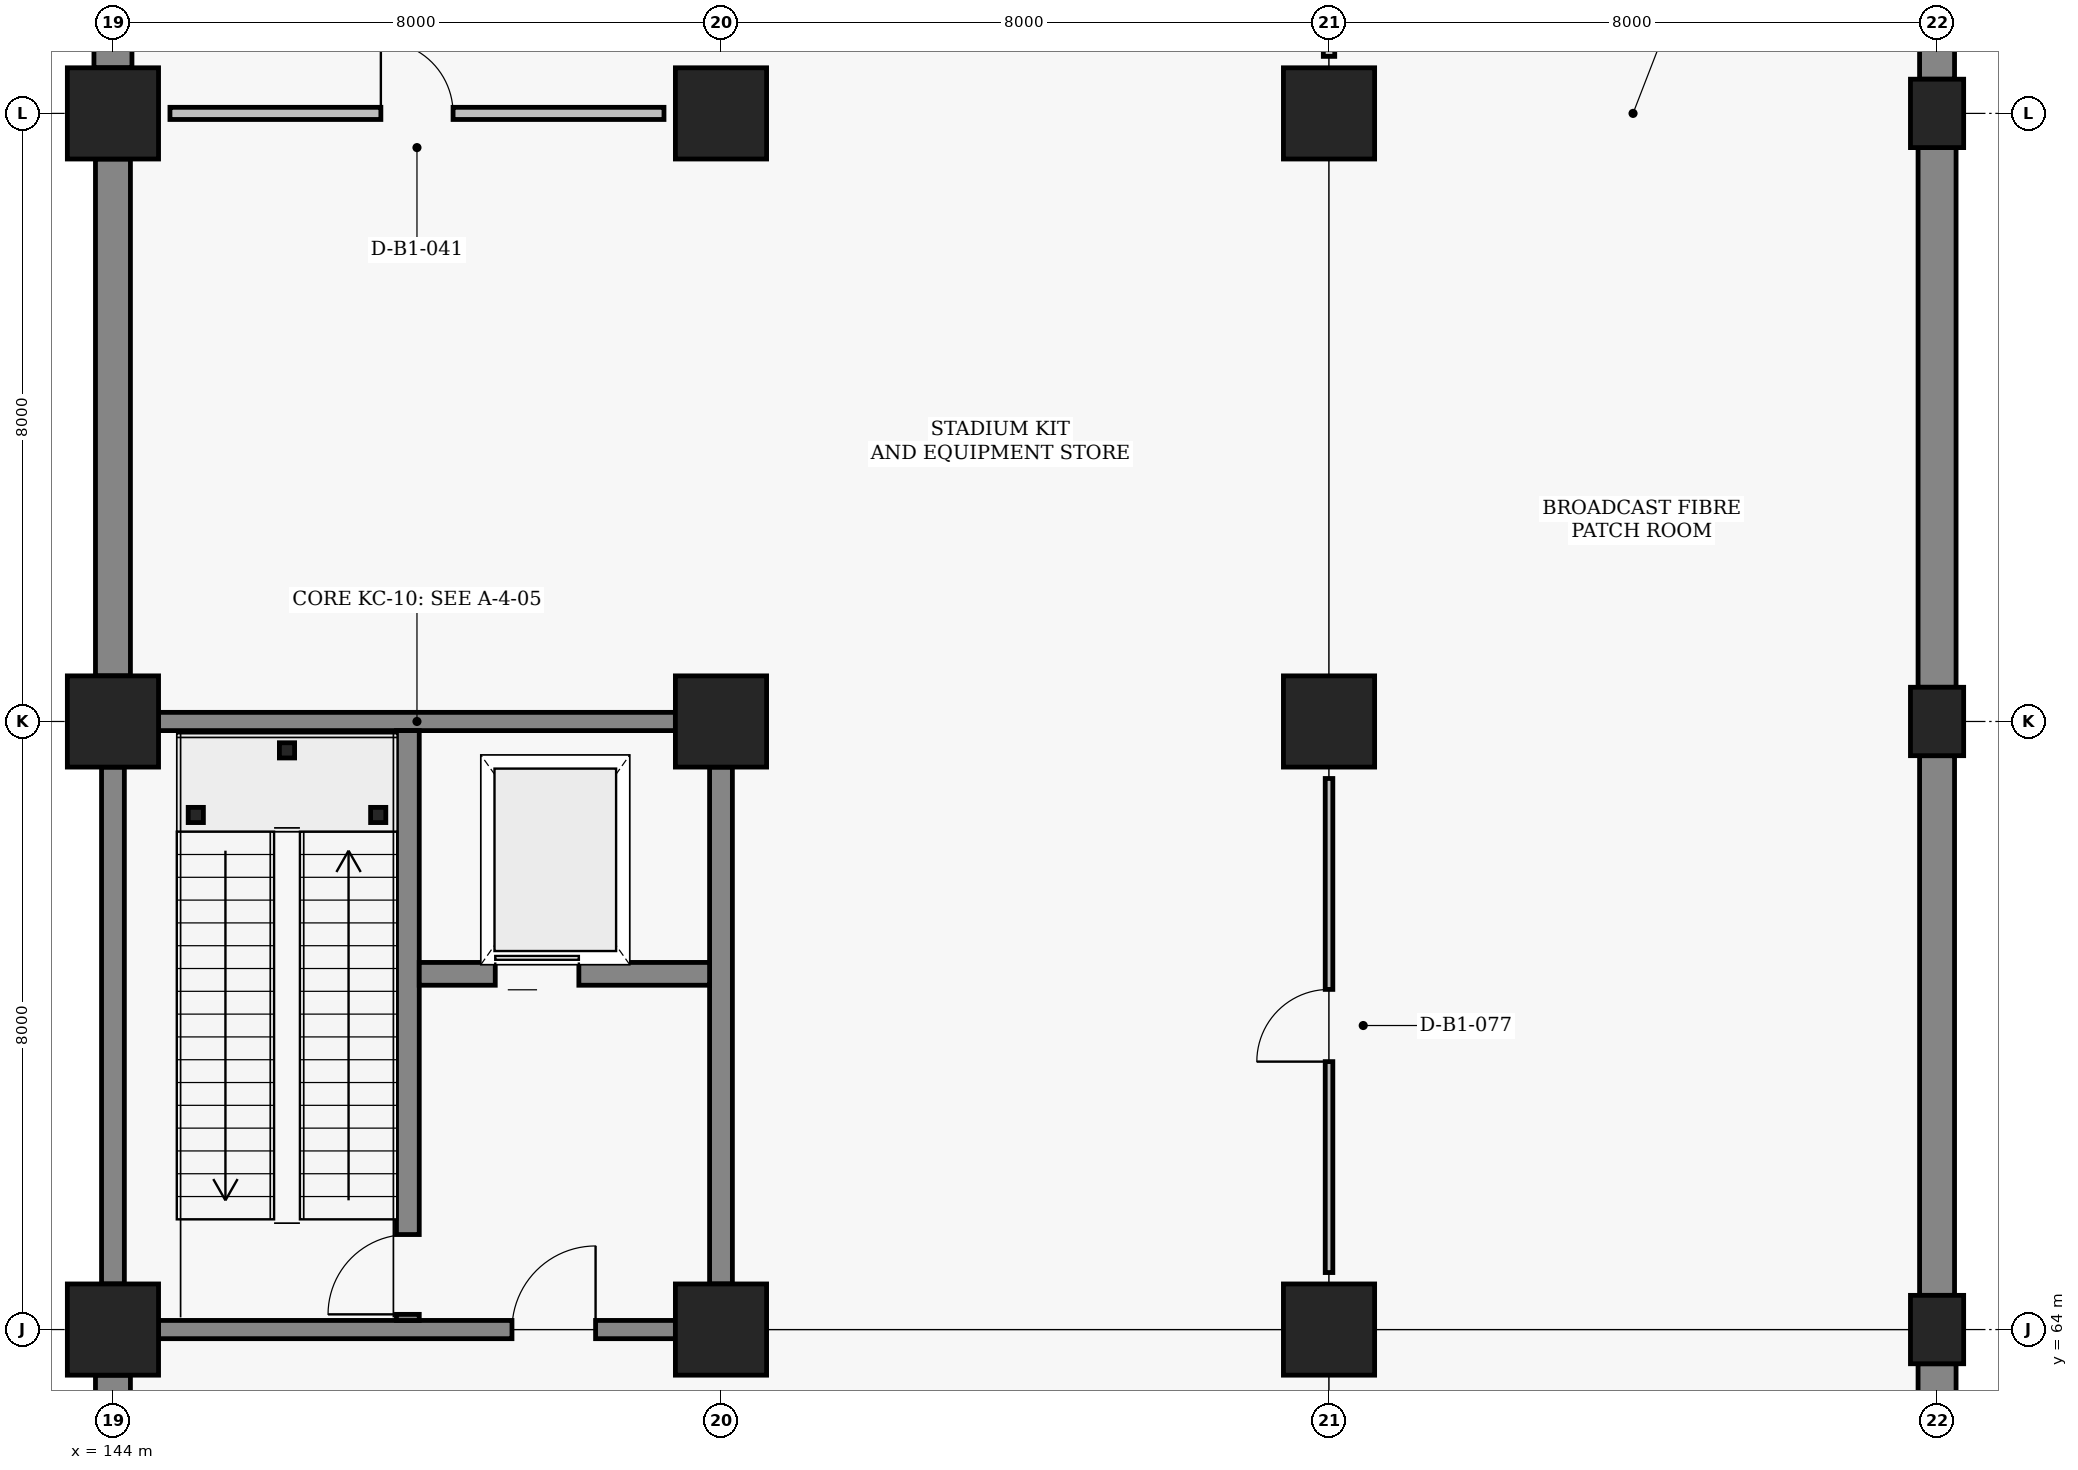
"""IFC4 building model, lengths in metres.
Left out: names, types, materials, properties, quantities, classifications, styles, units other than length and angle.
Written with IfcOpenShell. Run it as: python <this file> out.ifc"""

import sys

from ifc_helpers import new_model, si_unit, direction, frame, frame_2d, origin, origin_2d, place, context, subcontext, project, spatial, rectangle, hollow_rectangle, extrude, element, fill, save


model = new_model("IFC4")
c1 = context("Model", 3, precision=1e-05, world=origin(), true_north=direction((0.0, 1.0)))
c2 = subcontext(c1, "Body", "Model", "MODEL_VIEW")
j1 = project(units=[si_unit("LENGTHUNIT", "METRE"), si_unit("PLANEANGLEUNIT", "RADIAN")], contexts=[c1])
p1 = place(None, origin())
s1 = spatial("IfcSite", under=j1, at=p1, CompositionType="ELEMENT")
p2 = place(p1, origin())
s2 = spatial("IfcBuilding", under=s1, at=p2, CompositionType="ELEMENT")
p3 = place(p2, frame((0.0, 0.0, -5.4)))
s3 = spatial("IfcBuildingStorey", under=s2, at=p3, CompositionType="ELEMENT", Elevation=-5.4)
for number, where, z_axis, x_axis in (
    (1, (144.0, 64.0, 0.0), (0.0, 0.0, 1.0), (1.0, 0.0, 0.0)),
    (2, (144.0, 72.0, 0.0), (0.0, 0.0, 1.0), (1.0, 0.0, 0.0)),
    (3, (144.0, 80.0, 0.0), (0.0, 0.0, 1.0), (1.0, 0.0, 0.0)),
    (4, (152.0, 64.0, 0.0), (0.0, 0.0, 1.0), (1.0, 0.0, 0.0)),
    (5, (152.0, 72.0, 0.0), (0.0, 0.0, 1.0), (1.0, 0.0, 0.0)),
    (6, (152.0, 80.0, 0.0), (0.0, 0.0, 1.0), (1.0, 0.0, 0.0)),
    (7, (160.0, 64.0, 0.0), (0.0, 0.0, 1.0), (1.0, 0.0, 0.0)),
    (8, (160.0, 72.0, 0.0), (0.0, 0.0, 1.0), (1.0, 0.0, 0.0)),
    (9, (160.0, 80.0, 0.0), (0.0, 0.0, 1.0), (1.0, 0.0, 0.0)),
):
    element("IfcColumn", number, at=place(p3, frame(where, z_axis=z_axis, x_axis=x_axis)), inside=s3, PredefinedType="COLUMN", context=c2, shape_type="SweptSolid", body=[
        extrude(rectangle(XDim=1.2, YDim=1.2, at=origin_2d()), origin(), (0.0, 0.0, 1.0), 5.4),
    ])
for number, where, z_axis, x_axis in (
    (10, (168.0, 64.0, 0.0), (0.0, 0.0, 1.0), (1.0, 0.0, 0.0)),
    (11, (168.0, 72.0, 0.0), (0.0, 0.0, 1.0), (1.0, 0.0, 0.0)),
    (12, (168.0, 80.0, 0.0), (0.0, 0.0, 1.0), (1.0, 0.0, 0.0)),
):
    element("IfcColumn", number, at=place(p3, frame(where, z_axis=z_axis, x_axis=x_axis)), inside=s3, PredefinedType="COLUMN", context=c2, shape_type="SweptSolid", body=[
        extrude(rectangle(XDim=0.7, YDim=0.9, at=origin_2d()), origin(), (0.0, 0.0, 1.0), 5.4),
    ])
p4 = place(p3, frame((144.0, 56.6, 0.0), z_axis=(0.0, 0.0, 1.0), x_axis=(0.0, 1.0, 0.0)))
e13 = element("IfcWall", 13, at=p4, inside=s3, PredefinedType="STANDARD", context=c2, shape_type="SweptSolid", body=[
    extrude(rectangle(XDim=6.8, YDim=0.46, at=frame_2d((3.4, 0.0))), origin(), (0.0, 0.0, 1.0), 4.24),
])
p5 = place(p3, frame((144.0, 72.6, 0.0), z_axis=(0.0, 0.0, 1.0), x_axis=(0.0, 1.0, 0.0)))
e14 = element("IfcWall", 14, at=p5, inside=s3, PredefinedType="STANDARD", context=c2, shape_type="SweptSolid", body=[
    extrude(rectangle(XDim=6.8, YDim=0.46, at=frame_2d((3.4, 0.0))), origin(), (0.0, 0.0, 1.0), 3.69),
])
p6 = place(p3, frame((144.0, 80.6, 0.0), z_axis=(0.0, 0.0, 1.0), x_axis=(0.0, 1.0, 0.0)))
e15 = element("IfcWall", 15, at=p6, inside=s3, PredefinedType="STANDARD", context=c2, shape_type="SweptSolid", body=[
    extrude(rectangle(XDim=6.8, YDim=0.5, at=frame_2d((3.4, 0.0))), origin(), (0.0, 0.0, 1.0), 3.69),
])
p7 = place(p3, frame((168.0, 56.45, 0.0), z_axis=(0.0, 0.0, 1.0), x_axis=(0.0, 1.0, 0.0)))
e16 = element("IfcWall", 16, at=p7, inside=s3, PredefinedType="STANDARD", context=c2, shape_type="SweptSolid", body=[
    extrude(rectangle(XDim=7.1, YDim=0.5, at=frame_2d((3.55, 0.0))), origin(), (0.0, 0.0, 1.0), 3.69),
])
p8 = place(p3, frame((168.0, 64.45, 0.0), z_axis=(0.0, 0.0, 1.0), x_axis=(0.0, 1.0, 0.0)))
e17 = element("IfcWall", 17, at=p8, inside=s3, PredefinedType="STANDARD", context=c2, shape_type="SweptSolid", body=[
    extrude(rectangle(XDim=7.1, YDim=0.46, at=frame_2d((3.55, 0.0))), origin(), (0.0, 0.0, 1.0), 3.69),
])
p9 = place(p3, frame((168.0, 72.45, 0.0), z_axis=(0.0, 0.0, 1.0), x_axis=(0.0, 1.0, 0.0)))
e18 = element("IfcWall", 18, at=p9, inside=s3, PredefinedType="STANDARD", context=c2, shape_type="SweptSolid", body=[
    extrude(rectangle(XDim=7.1, YDim=0.5, at=frame_2d((3.55, 0.0))), origin(), (0.0, 0.0, 1.0), 4.24),
])
p10 = place(p3, frame((168.0, 80.45, 0.0), z_axis=(0.0, 0.0, 1.0), x_axis=(0.0, 1.0, 0.0)))
e19 = element("IfcWall", 19, at=p10, inside=s3, PredefinedType="STANDARD", context=c2, shape_type="SweptSolid", body=[
    extrude(rectangle(XDim=7.1, YDim=0.46, at=frame_2d((3.55, 0.0))), origin(), (0.0, 0.0, 1.0), 4.24),
])
p11 = place(p3, frame((144.6, 64.0, 0.0), z_axis=(0.0, 0.0, 1.0), x_axis=(1.0, 0.0, 0.0)))
e20 = element("IfcWall", 20, at=p11, inside=s3, PredefinedType="SHEAR", context=c2, shape_type="SweptSolid", body=[
    extrude(rectangle(XDim=6.8, YDim=0.24, at=frame_2d((3.4, 0.0))), origin(), (0.0, 0.0, 1.0), 4.24),
])
p12 = place(p11, frame((4.65, 0.0, 0.0)))
e21 = element("IfcOpeningElement", 21, at=p12, cuts=e20, PredefinedType="OPENING", context=c2, shape_type="SweptSolid", body=[
    extrude(rectangle(XDim=1.1, YDim=2.2, at=frame_2d((0.55, 1.1))), frame((0.0, 0.13, 0.0), z_axis=(0.0, -1.0, 0.0), x_axis=(1.0, 0.0, 0.0)), (0.0, 0.0, 1.0), 0.26),
])
p13 = place(p3, frame((144.6, 72.0, 0.0), z_axis=(0.0, 0.0, 1.0), x_axis=(1.0, 0.0, 0.0)))
e22 = element("IfcWall", 22, at=p13, inside=s3, PredefinedType="SHEAR", context=c2, shape_type="SweptSolid", body=[
    extrude(rectangle(XDim=6.8, YDim=0.24, at=frame_2d((3.4, 0.0))), origin(), (0.0, 0.0, 1.0), 3.69),
])
p14 = place(p3, frame((144.0, 64.6, 0.0), z_axis=(0.0, 0.0, 1.0), x_axis=(0.0, 1.0, 0.0)))
e23 = element("IfcWall", 23, at=p14, inside=s3, PredefinedType="SHEAR", context=c2, shape_type="SweptSolid", body=[
    extrude(rectangle(XDim=6.8, YDim=0.3, at=frame_2d((3.4, 0.0))), origin(), (0.0, 0.0, 1.0), 4.24),
])
p15 = place(p3, frame((152.0, 64.6, 0.0), z_axis=(0.0, 0.0, 1.0), x_axis=(0.0, 1.0, 0.0)))
e24 = element("IfcWall", 24, at=p15, inside=s3, PredefinedType="SHEAR", context=c2, shape_type="SweptSolid", body=[
    extrude(rectangle(XDim=6.8, YDim=0.3, at=frame_2d((3.4, 0.0))), origin(), (0.0, 0.0, 1.0), 3.69),
])
p16 = place(p3, frame((147.88, 64.12, 0.0), z_axis=(0.0, 0.0, 1.0), x_axis=(0.0, 1.0, 0.0)))
e25 = element("IfcWall", 25, at=p16, inside=s3, PredefinedType="SHEAR", context=c2, shape_type="SweptSolid", body=[
    extrude(rectangle(XDim=7.76, YDim=0.3, at=frame_2d((3.88, 0.0))), origin(), (0.0, 0.0, 1.0), 4.59),
])
p17 = place(p16, frame((0.08, 0.0, 0.0)))
e26 = element("IfcOpeningElement", 26, at=p17, cuts=e25, PredefinedType="OPENING", context=c2, shape_type="SweptSolid", body=[
    extrude(rectangle(XDim=1.05, YDim=2.15, at=frame_2d((0.525, 1.075))), frame((0.0, 0.16, 0.0), z_axis=(0.0, -1.0, 0.0), x_axis=(1.0, 0.0, 0.0)), (0.0, 0.0, 1.0), 0.32),
])
p18 = place(p3, frame((148.03, 68.68, 0.0), z_axis=(0.0, 0.0, 1.0), x_axis=(1.0, 0.0, 0.0)))
e27 = element("IfcWall", 27, at=p18, inside=s3, PredefinedType="SHEAR", context=c2, shape_type="SweptSolid", body=[
    extrude(rectangle(XDim=3.82, YDim=0.3, at=frame_2d((1.91, 0.0))), origin(), (0.0, 0.0, 1.0), 4.39),
])
p19 = place(p18, frame((1.0, 0.0, 0.0)))
e28 = element("IfcOpeningElement", 28, at=p19, cuts=e27, PredefinedType="OPENING", context=c2, shape_type="SweptSolid", body=[
    extrude(rectangle(XDim=1.1, YDim=2.15, at=frame_2d((0.55, 1.075))), frame((0.0, 0.16, 0.0), z_axis=(0.0, -1.0, 0.0), x_axis=(1.0, 0.0, 0.0)), (0.0, 0.0, 1.0), 0.32),
])
for number, where, z_axis, x_axis in (
    (29, (145.09, 70.77, 0.0), (0.0, 0.0, 1.0), (1.0, 0.0, 0.0)),
    (30, (147.49, 70.77, 0.0), (0.0, 0.0, 1.0), (1.0, 0.0, 0.0)),
    (31, (146.29, 71.62, 0.0), (0.0, 0.0, 1.0), (1.0, 0.0, 0.0)),
):
    element("IfcColumn", number, at=place(p3, frame(where, z_axis=z_axis, x_axis=x_axis)), inside=s3, PredefinedType="COLUMN", context=c2, shape_type="SweptSolid", body=[
        extrude(hollow_rectangle(XDim=0.2, YDim=0.2, WallThickness=0.009, at=origin_2d()), origin(), (0.0, 0.0, 1.0), 2.5),
    ])
p20 = place(p3, frame((144.75, 80.0, 0.0), z_axis=(0.0, 0.0, 1.0), x_axis=(1.0, 0.0, 0.0)))
e32 = element("IfcWall", 32, at=p20, inside=s3, PredefinedType="PARTITIONING", context=c2, shape_type="SweptSolid", body=[
    extrude(rectangle(XDim=6.5, YDim=0.16, at=frame_2d((3.25, 0.0))), origin(), (0.0, 0.0, 1.0), 3.69),
])
p21 = place(p20, frame((2.775, 0.0, 0.0)))
e33 = element("IfcOpeningElement", 33, at=p21, cuts=e32, PredefinedType="OPENING", context=c2, shape_type="SweptSolid", body=[
    extrude(rectangle(XDim=0.95, YDim=2.1, at=frame_2d((0.475, 1.05))), frame((0.0, 0.09, 0.0), z_axis=(0.0, -1.0, 0.0), x_axis=(1.0, 0.0, 0.0)), (0.0, 0.0, 1.0), 0.18),
])
p22 = place(p3, frame((160.0, 64.75, 0.0), z_axis=(0.0, 0.0, 1.0), x_axis=(0.0, 1.0, 0.0)))
e34 = element("IfcWall", 34, at=p22, inside=s3, PredefinedType="PARTITIONING", context=c2, shape_type="SweptSolid", body=[
    extrude(rectangle(XDim=6.5, YDim=0.1, at=frame_2d((3.25, 0.0))), origin(), (0.0, 0.0, 1.0), 3.69),
])
p23 = place(p22, frame((2.775, 0.0, 0.0)))
e35 = element("IfcOpeningElement", 35, at=p23, cuts=e34, PredefinedType="OPENING", context=c2, shape_type="SweptSolid", body=[
    extrude(rectangle(XDim=0.95, YDim=2.1, at=frame_2d((0.475, 1.05))), frame((0.0, 0.06, 0.0), z_axis=(0.0, -1.0, 0.0), x_axis=(1.0, 0.0, 0.0)), (0.0, 0.0, 1.0), 0.12),
])
p24 = place(p3, frame((160.0, 80.75, 0.0), z_axis=(0.0, 0.0, 1.0), x_axis=(0.0, 1.0, 0.0)))
e36 = element("IfcWall", 36, at=p24, inside=s3, PredefinedType="PARTITIONING", context=c2, shape_type="SweptSolid", body=[
    extrude(rectangle(XDim=6.5, YDim=0.15, at=frame_2d((3.25, 0.0))), origin(), (0.0, 0.0, 1.0), 4.39),
])
p25 = place(p24, frame((2.725, 0.0, 0.0)))
e37 = element("IfcOpeningElement", 37, at=p25, cuts=e36, PredefinedType="OPENING", context=c2, shape_type="SweptSolid", body=[
    extrude(rectangle(XDim=1.05, YDim=2.15, at=frame_2d((0.525, 1.075))), frame((0.0, 0.085, 0.0), z_axis=(0.0, -1.0, 0.0), x_axis=(1.0, 0.0, 0.0)), (0.0, 0.0, 1.0), 0.17),
])
p26 = place(p12, origin())
e38 = element("IfcDoor", 38, at=p26, inside=s3, OperationType="SINGLE_SWING_RIGHT", PredefinedType="DOOR", context=c2, shape_type="SweptSolid", body=[
    extrude(rectangle(XDim=1.1, YDim=2.2, at=frame_2d((0.55, 1.1))), frame((0.0, 0.025, 0.0), z_axis=(0.0, -1.0, 0.0), x_axis=(1.0, 0.0, 0.0)), (0.0, 0.0, 1.0), 0.05),
])
fill(e21, e38)
p27 = place(p17, origin())
e39 = element("IfcDoor", 39, at=p27, inside=s3, OperationType="SINGLE_SWING_LEFT", PredefinedType="DOOR", context=c2, shape_type="SweptSolid", body=[
    extrude(rectangle(XDim=1.05, YDim=2.15, at=frame_2d((0.525, 1.075))), frame((0.0, 0.025, 0.0), z_axis=(0.0, -1.0, 0.0), x_axis=(1.0, 0.0, 0.0)), (0.0, 0.0, 1.0), 0.05),
])
fill(e26, e39)
p28 = place(p19, origin())
e40 = element("IfcDoor", 40, at=p28, inside=s3, OperationType="SLIDING_TO_LEFT", PredefinedType="DOOR", context=c2, shape_type="SweptSolid", body=[
    extrude(rectangle(XDim=1.1, YDim=2.15, at=frame_2d((0.55, 1.075))), frame((0.0, 0.025, 0.0), z_axis=(0.0, -1.0, 0.0), x_axis=(1.0, 0.0, 0.0)), (0.0, 0.0, 1.0), 0.05),
])
fill(e28, e40)
p29 = place(p21, origin())
e41 = element("IfcDoor", 41, at=p29, inside=s3, OperationType="SINGLE_SWING_LEFT", PredefinedType="DOOR", context=c2, shape_type="SweptSolid", body=[
    extrude(rectangle(XDim=0.95, YDim=2.1, at=frame_2d((0.475, 1.05))), frame((0.0, 0.025, 0.0), z_axis=(0.0, -1.0, 0.0), x_axis=(1.0, 0.0, 0.0)), (0.0, 0.0, 1.0), 0.05),
])
fill(e33, e41)
p30 = place(p23, origin())
e42 = element("IfcDoor", 42, at=p30, inside=s3, OperationType="SINGLE_SWING_LEFT", PredefinedType="DOOR", context=c2, shape_type="SweptSolid", body=[
    extrude(rectangle(XDim=0.95, YDim=2.1, at=frame_2d((0.475, 1.05))), frame((0.0, 0.025, 0.0), z_axis=(0.0, -1.0, 0.0), x_axis=(1.0, 0.0, 0.0)), (0.0, 0.0, 1.0), 0.05),
])
fill(e35, e42)
save(model, sys.argv[1])
